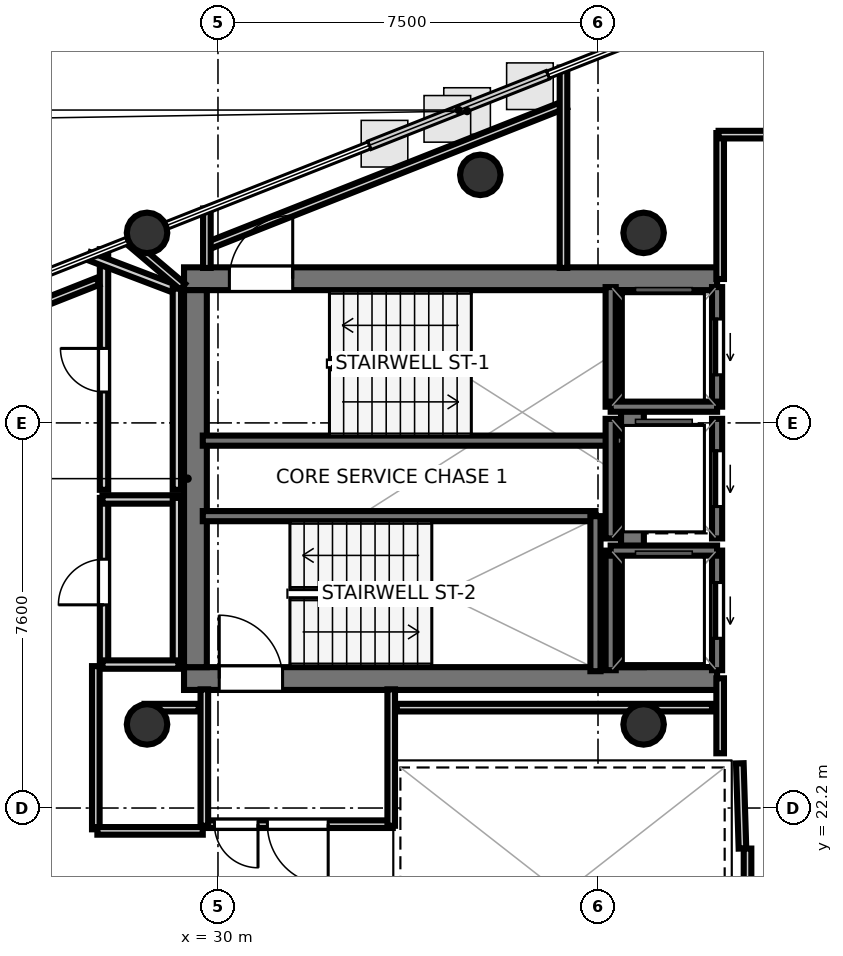
"""IFC4 building model, lengths in metres.
Left out: names, types, materials, properties, quantities, classifications, styles, units other than length and angle.
Written with IfcOpenShell. Run it as: python <this file> out.ifc"""

import sys

from ifc_helpers import new_model, si_unit, direction, frame, frame_2d, origin, origin_2d, place, context, subcontext, project, spatial, rectangle, hollow_circle, extrude, element, fill, save


model = new_model("IFC4")
c1 = context("Model", 3, precision=1e-05, world=origin(), true_north=direction((0.0, 1.0)))
c2 = subcontext(c1, "Body", "Model", "MODEL_VIEW")
j1 = project(units=[si_unit("LENGTHUNIT", "METRE"), si_unit("PLANEANGLEUNIT", "RADIAN")], contexts=[c1])
p1 = place(None, origin())
s1 = spatial("IfcSite", under=j1, at=p1, CompositionType="ELEMENT")
p2 = place(p1, origin())
s2 = spatial("IfcBuilding", under=s1, at=p2, CompositionType="ELEMENT")
p3 = place(p2, frame((0.0, 0.0, 344.4)))
s3 = spatial("IfcBuildingStorey", under=s2, at=p3, CompositionType="ELEMENT", Elevation=344.4)
p4 = place(p3, frame((29.33, 32.645, 0.0), z_axis=(0.0, 0.0, 1.0), x_axis=(1.0, 0.0, 0.0)))
e1 = element("IfcWall", 1, at=p4, inside=s3, PredefinedType="SHEAR", context=c2, shape_type="SweptSolid", body=[
    extrude(rectangle(XDim=10.52, YDim=0.45, at=frame_2d((5.26, 0.0))), origin(), (0.0, 0.0, 1.0), 3.52),
])
p5 = place(p4, frame((0.895, 0.0, 0.0)))
e2 = element("IfcOpeningElement", 2, at=p5, cuts=e1, PredefinedType="OPENING", context=c2, shape_type="SweptSolid", body=[
    extrude(rectangle(XDim=1.25, YDim=2.15, at=frame_2d((0.625, 1.075))), frame((0.0, 0.235, 0.0), z_axis=(0.0, -1.0, 0.0), x_axis=(1.0, 0.0, 0.0)), (0.0, 0.0, 1.0), 0.47),
])
p6 = place(p3, frame((29.33, 24.755, 0.0), z_axis=(0.0, 0.0, 1.0), x_axis=(1.0, 0.0, 0.0)))
e3 = element("IfcWall", 3, at=p6, inside=s3, PredefinedType="SHEAR", context=c2, shape_type="SweptSolid", body=[
    extrude(rectangle(XDim=10.52, YDim=0.45, at=frame_2d((5.26, 0.0))), origin(), (0.0, 0.0, 1.0), 3.52),
])
p7 = place(p6, frame((0.695, 0.0, 0.0)))
e4 = element("IfcOpeningElement", 4, at=p7, cuts=e3, PredefinedType="OPENING", context=c2, shape_type="SweptSolid", body=[
    extrude(rectangle(XDim=1.25, YDim=2.15, at=frame_2d((0.625, 1.075))), frame((0.0, 0.235, 0.0), z_axis=(0.0, -1.0, 0.0), x_axis=(1.0, 0.0, 0.0)), (0.0, 0.0, 1.0), 0.47),
])
for number, where, z_axis, x_axis in (
    (5, (29.555, 24.98, 0.0), (0.0, 0.0, 1.0), (0.0, 1.0, 0.0)),
    (6, (38.18, 24.98, 0.0), (0.0, 0.0, 1.0), (0.0, 1.0, 0.0)),
):
    element("IfcWall", number, at=place(p3, frame(where, z_axis=z_axis, x_axis=x_axis)), inside=s3, PredefinedType="SHEAR", context=c2, shape_type="SweptSolid", body=[
        extrude(rectangle(XDim=7.44, YDim=0.45, at=frame_2d((3.72, 0.0))), origin(), (0.0, 0.0, 1.0), 3.52),
    ])
for number, where, z_axis, x_axis in (
    (7, (28.6, 33.55, 0.0), (0.0, 0.0, 1.0), (1.0, 0.0, 0.0)),
    (8, (28.6, 23.85, 0.0), (0.0, 0.0, 1.0), (1.0, 0.0, 0.0)),
    (9, (38.4, 33.55, 0.0), (0.0, 0.0, 1.0), (1.0, 0.0, 0.0)),
    (10, (38.4, 23.85, 0.0), (0.0, 0.0, 1.0), (1.0, 0.0, 0.0)),
    (11, (35.177, 34.695, 0.0), (0.0, 0.0, 1.0), (1.0, 0.0, 0.0)),
):
    element("IfcColumn", number, at=place(p3, frame(where, z_axis=z_axis, x_axis=x_axis)), inside=s3, PredefinedType="COLUMN", context=c2, shape_type="SweptSolid", body=[
        extrude(hollow_circle(Radius=0.4, WallThickness=0.022, at=origin_2d()), origin(), (0.0, 0.0, 1.0), 3.7),
    ])
p8 = place(p3, frame((29.7, 29.45, 0.0), z_axis=(0.0, 0.0, 1.0), x_axis=(1.0, 0.0, 0.0)))
e12 = element("IfcWall", 12, at=p8, inside=s3, PredefinedType="SOLIDWALL", context=c2, shape_type="SweptSolid", body=[
    extrude(rectangle(XDim=8.3, YDim=0.2, at=frame_2d((4.15, 0.0))), origin(), (0.0, 0.0, 1.0), 3.52),
])
p9 = place(p3, frame((29.7, 27.96, 0.0), z_axis=(0.0, 0.0, 1.0), x_axis=(1.0, 0.0, 0.0)))
e13 = element("IfcWall", 13, at=p9, inside=s3, PredefinedType="SOLIDWALL", context=c2, shape_type="SweptSolid", body=[
    extrude(rectangle(XDim=7.75, YDim=0.2, at=frame_2d((3.875, 0.0))), origin(), (0.0, 0.0, 1.0), 3.52),
])
p10 = place(p3, frame((37.45, 24.9, 0.0), z_axis=(0.0, 0.0, 1.0), x_axis=(0.0, 1.0, 0.0)))
e14 = element("IfcWall", 14, at=p10, inside=s3, PredefinedType="SOLIDWALL", context=c2, shape_type="SweptSolid", body=[
    extrude(rectangle(XDim=3.06, YDim=0.2, at=frame_2d((1.53, 0.0))), origin(), (0.0, 0.0, 1.0), 3.52),
])
p11 = place(p3, frame((39.85, 30.12, 0.0), z_axis=(0.0, 0.0, 1.0), x_axis=(0.0, 1.0, 0.0)))
e15 = element("IfcWall", 15, at=p11, inside=s3, PredefinedType="SOLIDWALL", context=c2, shape_type="SweptSolid", body=[
    extrude(rectangle(XDim=2.36, YDim=0.2, at=frame_2d((1.18, 0.0))), origin(), (0.0, 0.0, 1.0), 3.52),
])
p12 = place(p11, frame((0.63, 0.0, 0.0)))
e16 = element("IfcOpeningElement", 16, at=p12, cuts=e15, PredefinedType="OPENING", context=c2, shape_type="SweptSolid", body=[
    extrude(rectangle(XDim=1.1, YDim=2.15, at=frame_2d((0.55, 1.075))), frame((0.0, 0.11, 0.0), z_axis=(0.0, -1.0, 0.0), x_axis=(1.0, 0.0, 0.0)), (0.0, 0.0, 1.0), 0.22),
])
p13 = place(p3, frame((37.75, 30.12, 0.0), z_axis=(0.0, 0.0, 1.0), x_axis=(0.0, 1.0, 0.0)))
e17 = element("IfcWall", 17, at=p13, inside=s3, PredefinedType="SOLIDWALL", context=c2, shape_type="SweptSolid", body=[
    extrude(rectangle(XDim=2.36, YDim=0.2, at=frame_2d((1.18, 0.0))), origin(), (0.0, 0.0, 1.0), 3.52),
])
p14 = place(p3, frame((37.75, 30.12, 0.0), z_axis=(0.0, 0.0, 1.0), x_axis=(1.0, 0.0, 0.0)))
e18 = element("IfcWall", 18, at=p14, inside=s3, PredefinedType="SOLIDWALL", context=c2, shape_type="SweptSolid", body=[
    extrude(rectangle(XDim=2.1, YDim=0.2, at=frame_2d((1.05, 0.0))), origin(), (0.0, 0.0, 1.0), 3.52),
])
p15 = place(p3, frame((39.85, 24.92, 0.0), z_axis=(0.0, 0.0, 1.0), x_axis=(0.0, 1.0, 0.0)))
e19 = element("IfcWall", 19, at=p15, inside=s3, PredefinedType="SOLIDWALL", context=c2, shape_type="SweptSolid", body=[
    extrude(rectangle(XDim=2.36, YDim=0.2, at=frame_2d((1.18, 0.0))), origin(), (0.0, 0.0, 1.0), 3.52),
])
p16 = place(p15, frame((0.63, 0.0, 0.0)))
e20 = element("IfcOpeningElement", 20, at=p16, cuts=e19, PredefinedType="OPENING", context=c2, shape_type="SweptSolid", body=[
    extrude(rectangle(XDim=1.1, YDim=2.15, at=frame_2d((0.55, 1.075))), frame((0.0, 0.11, 0.0), z_axis=(0.0, -1.0, 0.0), x_axis=(1.0, 0.0, 0.0)), (0.0, 0.0, 1.0), 0.22),
])
p17 = place(p3, frame((37.75, 24.92, 0.0), z_axis=(0.0, 0.0, 1.0), x_axis=(0.0, 1.0, 0.0)))
e21 = element("IfcWall", 21, at=p17, inside=s3, PredefinedType="SOLIDWALL", context=c2, shape_type="SweptSolid", body=[
    extrude(rectangle(XDim=2.36, YDim=0.2, at=frame_2d((1.18, 0.0))), origin(), (0.0, 0.0, 1.0), 3.52),
])
p18 = place(p3, frame((37.75, 27.28, 0.0), z_axis=(0.0, 0.0, 1.0), x_axis=(1.0, 0.0, 0.0)))
e22 = element("IfcWall", 22, at=p18, inside=s3, PredefinedType="SOLIDWALL", context=c2, shape_type="SweptSolid", body=[
    extrude(rectangle(XDim=2.1, YDim=0.2, at=frame_2d((1.05, 0.0))), origin(), (0.0, 0.0, 1.0), 3.52),
])
p19 = place(p3, frame((39.85, 27.52, 0.0), z_axis=(0.0, 0.0, 1.0), x_axis=(0.0, 1.0, 0.0)))
e23 = element("IfcWall", 23, at=p19, inside=s3, PredefinedType="SOLIDWALL", context=c2, shape_type="SweptSolid", body=[
    extrude(rectangle(XDim=2.36, YDim=0.2, at=frame_2d((1.18, 0.0))), origin(), (0.0, 0.0, 1.0), 3.52),
])
p20 = place(p19, frame((0.63, 0.0, 0.0)))
e24 = element("IfcOpeningElement", 24, at=p20, cuts=e23, PredefinedType="OPENING", context=c2, shape_type="SweptSolid", body=[
    extrude(rectangle(XDim=1.1, YDim=2.15, at=frame_2d((0.55, 1.075))), frame((0.0, 0.11, 0.0), z_axis=(0.0, -1.0, 0.0), x_axis=(1.0, 0.0, 0.0)), (0.0, 0.0, 1.0), 0.22),
])
p21 = place(p3, frame((37.75, 27.52, 0.0), z_axis=(0.0, 0.0, 1.0), x_axis=(0.0, 1.0, 0.0)))
e25 = element("IfcWall", 25, at=p21, inside=s3, PredefinedType="SOLIDWALL", context=c2, shape_type="SweptSolid", body=[
    extrude(rectangle(XDim=2.36, YDim=0.2, at=frame_2d((1.18, 0.0))), origin(), (0.0, 0.0, 1.0), 3.52),
])
p22 = place(p3, frame((29.761, 33.281, 0.0), z_axis=(0.0, 0.0, 1.0), x_axis=(0.929984111793, 0.367599716828, 0.0)))
e26 = element("IfcWall", 26, at=p22, inside=s3, PredefinedType="PARTITIONING", context=c2, shape_type="SweptSolid", body=[
    extrude(rectangle(XDim=7.634, YDim=0.15, at=frame_2d((3.817, 0.0))), origin(), (0.0, 0.0, 1.0), 2.84),
])
p23 = place(p3, frame((36.819, 36.812, 0.0), z_axis=(0.0, 0.0, 1.0), x_axis=(0.0, -1.0, 0.0)))
e27 = element("IfcWall", 27, at=p23, inside=s3, PredefinedType="PARTITIONING", context=c2, shape_type="SweptSolid", body=[
    extrude(rectangle(XDim=3.954, YDim=0.15, at=frame_2d((1.977, 0.0))), origin(), (0.0, 0.0, 1.0), 2.84),
])
p24 = place(p3, frame((29.781, 32.858, 0.0), z_axis=(0.0, 0.0, 1.0), x_axis=(0.0, 1.0, 0.0)))
e28 = element("IfcWall", 28, at=p24, inside=s3, PredefinedType="PARTITIONING", context=c2, shape_type="SweptSolid", body=[
    extrude(rectangle(XDim=1.173, YDim=0.15, at=frame_2d((0.586, 0.0))), origin(), (0.0, 0.0, 1.0), 2.84),
])
p25 = place(p3, frame((33.45, 21.881, 0.0), z_axis=(0.0, 0.0, 1.0), x_axis=(-1.0, 0.0, 0.0)))
e29 = element("IfcWall", 29, at=p25, inside=s3, PredefinedType="PARTITIONING", context=c2, shape_type="SweptSolid", body=[
    extrude(rectangle(XDim=3.75, YDim=0.15, at=frame_2d((1.875, 0.0))), origin(), (0.0, 0.0, 1.0), 2.84),
])
p26 = place(p25, frame((1.275, 0.0, 0.0)))
e30 = element("IfcOpeningElement", 30, at=p26, cuts=e29, PredefinedType="OPENING", context=c2, shape_type="SweptSolid", body=[
    extrude(rectangle(XDim=1.2, YDim=2.15, at=frame_2d((0.6, 1.075))), frame((0.0, 0.085, 0.0), z_axis=(0.0, -1.0, 0.0), x_axis=(1.0, 0.0, 0.0)), (0.0, 0.0, 1.0), 0.17),
])
p27 = place(p25, frame((2.66, 0.0, 0.0)))
e31 = element("IfcOpeningElement", 31, at=p27, cuts=e29, PredefinedType="OPENING", context=c2, shape_type="SweptSolid", body=[
    extrude(rectangle(XDim=0.86, YDim=2.05, at=frame_2d((0.43, 1.025))), frame((0.0, 0.085, 0.0), z_axis=(0.0, -1.0, 0.0), x_axis=(1.0, 0.0, 0.0)), (0.0, 0.0, 1.0), 0.17),
])
for number, where, z_axis, x_axis in (
    (32, (29.731, 21.85, 0.0), (0.0, 0.0, 1.0), (0.0, 1.0, 0.0)),
    (33, (33.419, 24.542, 0.0), (0.0, 0.0, 1.0), (0.0, -1.0, 0.0)),
):
    element("IfcWall", number, at=place(p3, frame(where, z_axis=z_axis, x_axis=x_axis)), inside=s3, PredefinedType="PARTITIONING", context=c2, shape_type="SweptSolid", body=[
        extrude(rectangle(XDim=2.692, YDim=0.15, at=frame_2d((1.346, 0.0))), origin(), (0.0, 0.0, 1.0), 2.84),
    ])
p28 = place(p3, frame((40.351, 21.401, 0.0), z_axis=(0.0, 0.0, 1.0), x_axis=(-0.031058045979, 0.999517582527, 0.0)))
e34 = element("IfcWall", 34, at=p28, inside=s3, PredefinedType="PARTITIONING", context=c2, shape_type="SweptSolid", body=[
    extrude(rectangle(XDim=1.682, YDim=0.15, at=frame_2d((0.841, 0.0))), origin(), (0.0, 0.0, 1.0), 2.84),
])
p29 = place(p3, frame((39.911, 23.28, 0.0), z_axis=(0.0, 0.0, 1.0), x_axis=(0.0, 1.0, 0.0)))
e35 = element("IfcWall", 35, at=p29, inside=s3, PredefinedType="PARTITIONING", context=c2, shape_type="SweptSolid", body=[
    extrude(rectangle(XDim=1.48, YDim=0.15, at=frame_2d((0.74, 0.0))), origin(), (0.0, 0.0, 1.0), 2.84),
])
p30 = place(p3, frame((39.911, 32.64, 0.0), z_axis=(0.0, 0.0, 1.0), x_axis=(0.0, 1.0, 0.0)))
e36 = element("IfcWall", 36, at=p30, inside=s3, PredefinedType="PARTITIONING", context=c2, shape_type="SweptSolid", body=[
    extrude(rectangle(XDim=2.88, YDim=0.15, at=frame_2d((1.44, 0.0))), origin(), (0.0, 0.0, 1.0), 2.84),
])
p31 = place(p3, frame((39.88, 35.489, 0.0), z_axis=(0.0, 0.0, 1.0), x_axis=(1.0, 0.0, 0.0)))
e37 = element("IfcWall", 37, at=p31, inside=s3, PredefinedType="PARTITIONING", context=c2, shape_type="SweptSolid", body=[
    extrude(rectangle(XDim=1.48, YDim=0.15, at=frame_2d((0.74, 0.0))), origin(), (0.0, 0.0, 1.0), 2.84),
])
p32 = place(p3, frame((40.451, 18.08, 0.0), z_axis=(0.0, 0.0, 1.0), x_axis=(0.0, 1.0, 0.0)))
e38 = element("IfcWall", 38, at=p32, inside=s3, PredefinedType="PARTITIONING", context=c2, shape_type="SweptSolid", body=[
    extrude(rectangle(XDim=3.32, YDim=0.15, at=frame_2d((1.66, 0.0))), origin(), (0.0, 0.0, 1.0), 2.84),
])
p33 = place(p3, frame((27.751, 25.0, 0.0), z_axis=(0.0, 0.0, 1.0), x_axis=(0.0, 1.0, 0.0)))
e39 = element("IfcWall", 39, at=p33, inside=s3, PredefinedType="PLUMBINGWALL", context=c2, shape_type="SweptSolid", body=[
    extrude(rectangle(XDim=3.32, YDim=0.165, at=frame_2d((1.66, 0.0))), origin(), (0.0, 0.0, 1.0), 2.84),
])
p34 = place(p33, frame((1.21, 0.0, 0.0)))
e40 = element("IfcOpeningElement", 40, at=p34, cuts=e39, PredefinedType="OPENING", context=c2, shape_type="SweptSolid", body=[
    extrude(rectangle(XDim=0.9, YDim=2.1, at=frame_2d((0.45, 1.05))), frame((0.0, 0.093, 0.0), z_axis=(0.0, -1.0, 0.0), x_axis=(1.0, 0.0, 0.0)), (0.0, 0.0, 1.0), 0.185),
])
p35 = place(p3, frame((27.72, 28.289, 0.0), z_axis=(0.0, 0.0, 1.0), x_axis=(1.0, 0.0, 0.0)))
e41 = element("IfcWall", 41, at=p35, inside=s3, PredefinedType="PLUMBINGWALL", context=c2, shape_type="SweptSolid", body=[
    extrude(rectangle(XDim=1.5, YDim=0.165, at=frame_2d((0.75, 0.0))), origin(), (0.0, 0.0, 1.0), 2.84),
])
p36 = place(p3, frame((29.189, 28.32, 0.0), z_axis=(0.0, 0.0, 1.0), x_axis=(0.0, -1.0, 0.0)))
e42 = element("IfcWall", 42, at=p36, inside=s3, PredefinedType="PLUMBINGWALL", context=c2, shape_type="SweptSolid", body=[
    extrude(rectangle(XDim=3.32, YDim=0.165, at=frame_2d((1.66, 0.0))), origin(), (0.0, 0.0, 1.0), 2.84),
])
p37 = place(p3, frame((29.22, 25.031, 0.0), z_axis=(0.0, 0.0, 1.0), x_axis=(-1.0, 0.0, 0.0)))
e43 = element("IfcWall", 43, at=p37, inside=s3, PredefinedType="PLUMBINGWALL", context=c2, shape_type="SweptSolid", body=[
    extrude(rectangle(XDim=1.5, YDim=0.165, at=frame_2d((0.75, 0.0))), origin(), (0.0, 0.0, 1.0), 2.84),
])
p38 = place(p3, frame((27.751, 28.48, 0.0), z_axis=(0.0, 0.0, 1.0), x_axis=(0.0, 1.0, 0.0)))
e44 = element("IfcWall", 44, at=p38, inside=s3, PredefinedType="PLUMBINGWALL", context=c2, shape_type="SweptSolid", body=[
    extrude(rectangle(XDim=4.748, YDim=0.165, at=frame_2d((2.374, 0.0))), origin(), (0.0, 0.0, 1.0), 2.84),
])
p39 = place(p38, frame((1.93, 0.0, 0.0)))
e45 = element("IfcOpeningElement", 45, at=p39, cuts=e44, PredefinedType="OPENING", context=c2, shape_type="SweptSolid", body=[
    extrude(rectangle(XDim=0.86, YDim=2.05, at=frame_2d((0.43, 1.025))), frame((0.0, 0.093, 0.0), z_axis=(0.0, -1.0, 0.0), x_axis=(1.0, 0.0, 0.0)), (0.0, 0.0, 1.0), 0.185),
])
p40 = place(p3, frame((27.455, 33.091, 0.0), z_axis=(0.0, 0.0, 1.0), x_axis=(0.934602347304, -0.355694324406, 0.0)))
e46 = element("IfcWall", 46, at=p40, inside=s3, PredefinedType="PLUMBINGWALL", context=c2, shape_type="SweptSolid", body=[
    extrude(rectangle(XDim=1.889, YDim=0.165, at=frame_2d((0.944, 0.0))), origin(), (0.0, 0.0, 1.0), 2.84),
])
p41 = place(p3, frame((29.189, 32.45, 0.0), z_axis=(0.0, 0.0, 1.0), x_axis=(0.0, -1.0, 0.0)))
e47 = element("IfcWall", 47, at=p41, inside=s3, PredefinedType="PLUMBINGWALL", context=c2, shape_type="SweptSolid", body=[
    extrude(rectangle(XDim=3.97, YDim=0.165, at=frame_2d((1.985, 0.0))), origin(), (0.0, 0.0, 1.0), 2.84),
])
p42 = place(p3, frame((29.62, 24.181, 0.0), z_axis=(0.0, 0.0, 1.0), x_axis=(-1.0, 0.0, 0.0)))
e48 = element("IfcWall", 48, at=p42, inside=s3, PredefinedType="PARTITIONING", context=c2, shape_type="SweptSolid", body=[
    extrude(rectangle(XDim=1.07, YDim=0.15, at=frame_2d((0.535, 0.0))), origin(), (0.0, 0.0, 1.0), 2.84),
])
p43 = place(p3, frame((29.303, 32.489, 0.0), z_axis=(0.0, 0.0, 1.0), x_axis=(-0.762799786906, 0.646634738547, 0.0)))
e49 = element("IfcWall", 49, at=p43, inside=s3, PredefinedType="PARTITIONING", context=c2, shape_type="SweptSolid", body=[
    extrude(rectangle(XDim=1.406, YDim=0.15, at=frame_2d((0.703, 0.0))), origin(), (0.0, 0.0, 1.0), 2.84),
])
p44 = place(p3, frame((39.75, 24.181, 0.0), z_axis=(0.0, 0.0, 1.0), x_axis=(-1.0, 0.0, 0.0)))
e50 = element("IfcWall", 50, at=p44, inside=s3, PredefinedType="PARTITIONING", context=c2, shape_type="SweptSolid", body=[
    extrude(rectangle(XDim=6.22, YDim=0.15, at=frame_2d((3.11, 0.0))), origin(), (0.0, 0.0, 1.0), 2.84),
])
p45 = place(p3, frame((25.661, 31.816, 0.0), z_axis=(0.0, 0.0, 1.0), x_axis=(0.929963469363, 0.367651935465, 0.0)))
e51 = element("IfcWall", 51, at=p45, inside=s3, PredefinedType="PARTITIONING", context=c2, shape_type="SweptSolid", body=[
    extrude(rectangle(XDim=2.118, YDim=0.15, at=frame_2d((1.059, 0.0))), origin(), (0.0, 0.0, 1.0), 2.84),
])
p46 = place(p3, frame((27.589, 25.0, 0.0), z_axis=(0.0, 0.0, 1.0), x_axis=(0.0, -1.0, 0.0)))
e52 = element("IfcWall", 52, at=p46, inside=s3, PredefinedType="PARTITIONING", context=c2, shape_type="SweptSolid", body=[
    extrude(rectangle(XDim=3.22, YDim=0.15, at=frame_2d((1.61, 0.0))), origin(), (0.0, 0.0, 1.0), 2.84),
])
p47 = place(p3, frame((27.62, 21.749, 0.0), z_axis=(0.0, 0.0, 1.0), x_axis=(1.0, 0.0, 0.0)))
e53 = element("IfcWall", 53, at=p47, inside=s3, PredefinedType="PARTITIONING", context=c2, shape_type="SweptSolid", body=[
    extrude(rectangle(XDim=2.08, YDim=0.15, at=frame_2d((1.04, 0.0))), origin(), (0.0, 0.0, 1.0), 2.84),
])
p48 = place(p5, origin())
e54 = element("IfcDoor", 54, at=p48, inside=s3, OperationType="SINGLE_SWING_RIGHT", PredefinedType="DOOR", context=c2, shape_type="SweptSolid", body=[
    extrude(rectangle(XDim=1.25, YDim=2.15, at=frame_2d((0.625, 1.075))), frame((0.0, 0.025, 0.0), z_axis=(0.0, -1.0, 0.0), x_axis=(1.0, 0.0, 0.0)), (0.0, 0.0, 1.0), 0.05),
])
fill(e2, e54)
p49 = place(p7, origin())
e55 = element("IfcDoor", 55, at=p49, inside=s3, OperationType="SINGLE_SWING_LEFT", PredefinedType="DOOR", context=c2, shape_type="SweptSolid", body=[
    extrude(rectangle(XDim=1.25, YDim=2.15, at=frame_2d((0.625, 1.075))), frame((0.0, 0.025, 0.0), z_axis=(0.0, -1.0, 0.0), x_axis=(1.0, 0.0, 0.0)), (0.0, 0.0, 1.0), 0.05),
])
fill(e4, e55)
p50 = place(p12, origin())
e56 = element("IfcDoor", 56, at=p50, inside=s3, OperationType="SLIDING_TO_LEFT", PredefinedType="DOOR", context=c2, shape_type="SweptSolid", body=[
    extrude(rectangle(XDim=1.1, YDim=2.15, at=frame_2d((0.55, 1.075))), frame((0.0, 0.025, 0.0), z_axis=(0.0, -1.0, 0.0), x_axis=(1.0, 0.0, 0.0)), (0.0, 0.0, 1.0), 0.05),
])
fill(e16, e56)
p51 = place(p16, origin())
e57 = element("IfcDoor", 57, at=p51, inside=s3, OperationType="SLIDING_TO_LEFT", PredefinedType="DOOR", context=c2, shape_type="SweptSolid", body=[
    extrude(rectangle(XDim=1.1, YDim=2.15, at=frame_2d((0.55, 1.075))), frame((0.0, 0.025, 0.0), z_axis=(0.0, -1.0, 0.0), x_axis=(1.0, 0.0, 0.0)), (0.0, 0.0, 1.0), 0.05),
])
fill(e20, e57)
p52 = place(p20, origin())
e58 = element("IfcDoor", 58, at=p52, inside=s3, OperationType="SLIDING_TO_LEFT", PredefinedType="DOOR", context=c2, shape_type="SweptSolid", body=[
    extrude(rectangle(XDim=1.1, YDim=2.15, at=frame_2d((0.55, 1.075))), frame((0.0, 0.025, 0.0), z_axis=(0.0, -1.0, 0.0), x_axis=(1.0, 0.0, 0.0)), (0.0, 0.0, 1.0), 0.05),
])
fill(e24, e58)
p53 = place(p26, origin())
e59 = element("IfcDoor", 59, at=p53, inside=s3, OperationType="SINGLE_SWING_LEFT", PredefinedType="DOOR", context=c2, shape_type="SweptSolid", body=[
    extrude(rectangle(XDim=1.2, YDim=2.15, at=frame_2d((0.6, 1.075))), frame((0.0, 0.025, 0.0), z_axis=(0.0, -1.0, 0.0), x_axis=(1.0, 0.0, 0.0)), (0.0, 0.0, 1.0), 0.05),
])
fill(e30, e59)
p54 = place(p34, origin())
e60 = element("IfcDoor", 60, at=p54, inside=s3, OperationType="SINGLE_SWING_LEFT", PredefinedType="DOOR", context=c2, shape_type="SweptSolid", body=[
    extrude(rectangle(XDim=0.9, YDim=2.1, at=frame_2d((0.45, 1.05))), frame((0.0, 0.025, 0.0), z_axis=(0.0, -1.0, 0.0), x_axis=(1.0, 0.0, 0.0)), (0.0, 0.0, 1.0), 0.05),
])
fill(e40, e60)
p55 = place(p39, origin())
e61 = element("IfcDoor", 61, at=p55, inside=s3, OperationType="SINGLE_SWING_RIGHT", PredefinedType="DOOR", context=c2, shape_type="SweptSolid", body=[
    extrude(rectangle(XDim=0.86, YDim=2.05, at=frame_2d((0.43, 1.025))), frame((0.0, 0.025, 0.0), z_axis=(0.0, -1.0, 0.0), x_axis=(1.0, 0.0, 0.0)), (0.0, 0.0, 1.0), 0.05),
])
fill(e45, e61)
p56 = place(p27, origin())
e62 = element("IfcDoor", 62, at=p56, inside=s3, OperationType="SINGLE_SWING_LEFT", PredefinedType="DOOR", context=c2, shape_type="SweptSolid", body=[
    extrude(rectangle(XDim=0.86, YDim=2.05, at=frame_2d((0.43, 1.025))), frame((0.0, 0.025, 0.0), z_axis=(0.0, -1.0, 0.0), x_axis=(1.0, 0.0, 0.0)), (0.0, 0.0, 1.0), 0.05),
])
fill(e31, e62)
save(model, sys.argv[1])
